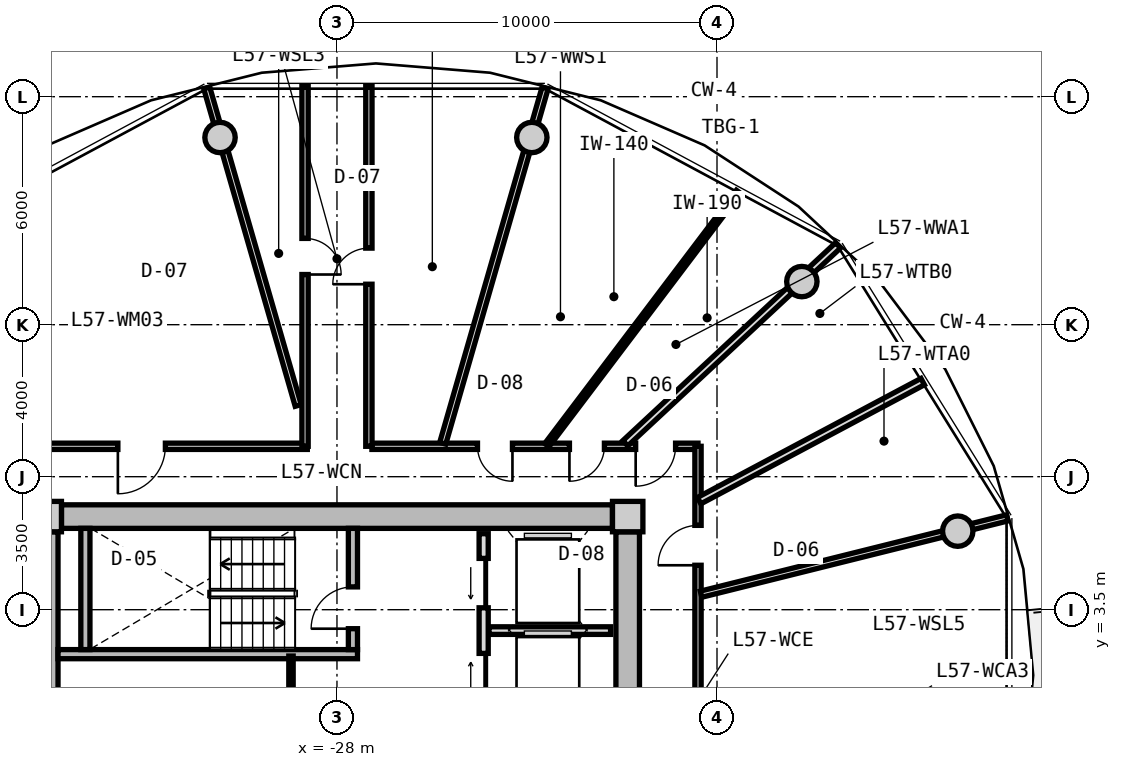
"""IFC4 building model, lengths in metres.
Left out: names, types, materials, properties, quantities, classifications, styles, units other than length and angle.
Written with IfcOpenShell. Run it as: python <this file> out.ifc"""

import sys

from ifc_helpers import new_model, si_unit, direction, frame, frame_2d, origin, origin_2d, place, context, subcontext, project, spatial, rectangle, circle, extrude, source, transform, mapped, element, fill, save


model = new_model("IFC4")
c1 = context("Model", 3, precision=1e-05, world=origin(), true_north=direction((0.0, 1.0)))
c2 = subcontext(c1, "Body", "Model", "MODEL_VIEW")
j1 = project(units=[si_unit("LENGTHUNIT", "METRE"), si_unit("PLANEANGLEUNIT", "RADIAN")], contexts=[c1])
p1 = place(None, origin())
s1 = spatial("IfcSite", under=j1, at=p1, CompositionType="ELEMENT")
p2 = place(p1, origin())
s2 = spatial("IfcBuilding", under=s1, at=p2, CompositionType="ELEMENT")
p3 = place(p2, frame((0.0, 0.0, 183.1)))
s3 = spatial("IfcBuildingStorey", under=s2, at=p3, CompositionType="ELEMENT", Elevation=183.1)
m1 = source(origin(), c2, "Body", "SweptSolid", [
    extrude(rectangle(XDim=0.8, YDim=0.8, at=origin_2d()), origin(), (0.0, 0.0, 1.0), 3.05),
])
for number, where, z_axis, x_axis in (
    (1, (-20.35, 5.95, 0.0), (0.0, 0.0, 1.0), (1.0, 0.0, 0.0)),
    (2, (-35.65, 5.95, 0.0), (0.0, 0.0, 1.0), (1.0, 0.0, 0.0)),
):
    element("IfcColumn", number, at=place(p3, frame(where, z_axis=z_axis, x_axis=x_axis)), inside=s3, PredefinedType="COLUMN", context=c2, shape_type="MappedRepresentation", body=[
        mapped(m1, transform((0.0, 0.0, 0.0), x_axis=(1.0, 0.0, 0.0), y_axis=(0.0, 1.0, 0.0), z_axis=(0.0, 0.0, 1.0), scale=1.0)),
    ])
m2 = source(origin(), c2, "Body", "SweptSolid", [
    extrude(rectangle(XDim=14.5, YDim=0.62, at=frame_2d((7.25, 0.0))), origin(), (0.0, 0.0, 1.0), 2.73),
])
p4 = place(p3, frame((-35.25, 5.95, 0.0), z_axis=(0.0, 0.0, 1.0), x_axis=(1.0, 0.0, 0.0)))
e3 = element("IfcWall", 3, at=p4, inside=s3, PredefinedType="SHEAR", context=c2, shape_type="MappedRepresentation", body=[
    mapped(m2, transform((0.0, 0.0, 0.0), x_axis=(1.0, 0.0, 0.0), y_axis=(0.0, 1.0, 0.0), z_axis=(0.0, 0.0, 1.0), scale=1.0)),
])
m3 = source(origin(), c2, "Body", "SweptSolid", [
    extrude(rectangle(XDim=11.1, YDim=0.62, at=frame_2d((5.55, 0.0))), origin(), (0.0, 0.0, 1.0), 2.73),
])
p5 = place(p3, frame((-35.65, -5.55, 0.0), z_axis=(0.0, 0.0, 1.0), x_axis=(0.0, 1.0, 0.0)))
e4 = element("IfcWall", 4, at=p5, inside=s3, PredefinedType="SHEAR", context=c2, shape_type="MappedRepresentation", body=[
    mapped(m3, transform((0.0, 0.0, 0.0), x_axis=(1.0, 0.0, 0.0), y_axis=(0.0, 1.0, 0.0), z_axis=(0.0, 0.0, 1.0), scale=1.0)),
])
p6 = place(p5, frame((3.8, 0.0, 0.0)))
e5 = element("IfcOpeningElement", 5, at=p6, cuts=e4, PredefinedType="OPENING", context=c2, shape_type="SweptSolid", body=[
    extrude(rectangle(XDim=1.2, YDim=2.15, at=frame_2d((0.6, 1.075))), frame((0.0, 0.32, 0.0), z_axis=(0.0, -1.0, 0.0), x_axis=(1.0, 0.0, 0.0)), (0.0, 0.0, 1.0), 0.64),
])
p7 = place(p3, frame((-20.35, 5.55, 0.0), z_axis=(0.0, 0.0, 1.0), x_axis=(0.0, -1.0, 0.0)))
e6 = element("IfcWall", 6, at=p7, inside=s3, PredefinedType="SHEAR", context=c2, shape_type="MappedRepresentation", body=[
    mapped(m3, transform((0.0, 0.0, 0.0), x_axis=(1.0, 0.0, 0.0), y_axis=(0.0, 1.0, 0.0), z_axis=(0.0, 0.0, 1.0), scale=1.0)),
])
p8 = place(p7, frame((5.65, 0.0, 0.0)))
e7 = element("IfcOpeningElement", 7, at=p8, cuts=e6, PredefinedType="OPENING", context=c2, shape_type="SweptSolid", body=[
    extrude(rectangle(XDim=1.2, YDim=2.15, at=frame_2d((0.6, 1.075))), frame((0.0, 0.32, 0.0), z_axis=(0.0, -1.0, 0.0), x_axis=(1.0, 0.0, 0.0)), (0.0, 0.0, 1.0), 0.64),
])
m4 = source(origin(), c2, "Body", "SweptSolid", [
    extrude(circle(Radius=0.4, at=origin_2d()), origin(), (0.0, 0.0, 1.0), 3.05),
])
for number, where, z_axis, x_axis in (
    (8, (-11.665, 5.567, 0.0), (0.0, 0.0, 1.0), (1.0, 0.0, 0.0)),
    (9, (-15.767, 12.135, 0.0), (0.0, 0.0, 1.0), (1.0, 0.0, 0.0)),
    (10, (-22.873, 15.926, 0.0), (0.0, 0.0, 1.0), (1.0, 0.0, 0.0)),
    (11, (-31.077, 15.926, 0.0), (0.0, 0.0, 1.0), (1.0, 0.0, 0.0)),
):
    element("IfcColumn", number, at=place(p3, frame(where, z_axis=z_axis, x_axis=x_axis)), inside=s3, PredefinedType="COLUMN", context=c2, shape_type="MappedRepresentation", body=[
        mapped(m4, transform((0.0, 0.0, 0.0), x_axis=(1.0, 0.0, 0.0), y_axis=(0.0, 1.0, 0.0), z_axis=(0.0, 0.0, 1.0), scale=1.0)),
    ])
m5 = source(origin(), c2, "Body", "SweptSolid", [
    extrude(rectangle(XDim=7.88, YDim=0.24, at=frame_2d((3.94, 0.0))), origin(), (0.0, 0.0, 1.0), 2.73),
])
p9 = place(p3, frame((-35.34, 2.33, 0.0), z_axis=(0.0, 0.0, 1.0), x_axis=(1.0, 0.0, 0.0)))
e12 = element("IfcWall", 12, at=p9, inside=s3, PredefinedType="PARTITIONING", context=c2, shape_type="MappedRepresentation", body=[
    mapped(m5, transform((0.0, 0.0, 0.0), x_axis=(1.0, 0.0, 0.0), y_axis=(0.0, 1.0, 0.0), z_axis=(0.0, 0.0, 1.0), scale=1.0)),
])
m6 = source(origin(), c2, "Body", "SweptSolid", [
    extrude(rectangle(XDim=3.19, YDim=0.24, at=frame_2d((1.595, 0.0))), origin(), (0.0, 0.0, 1.0), 2.73),
])
p10 = place(p3, frame((-34.62, 2.45, 0.0), z_axis=(0.0, 0.0, 1.0), x_axis=(0.0, 1.0, 0.0)))
e13 = element("IfcWall", 13, at=p10, inside=s3, PredefinedType="PARTITIONING", context=c2, shape_type="MappedRepresentation", body=[
    mapped(m6, transform((0.0, 0.0, 0.0), x_axis=(1.0, 0.0, 0.0), y_axis=(0.0, 1.0, 0.0), z_axis=(0.0, 0.0, 1.0), scale=1.0)),
])
p11 = place(p3, frame((-27.58, 2.45, 0.0), z_axis=(0.0, 0.0, 1.0), x_axis=(0.0, 1.0, 0.0)))
e14 = element("IfcWall", 14, at=p11, inside=s3, PredefinedType="PARTITIONING", context=c2, shape_type="MappedRepresentation", body=[
    mapped(m6, transform((0.0, 0.0, 0.0), x_axis=(1.0, 0.0, 0.0), y_axis=(0.0, 1.0, 0.0), z_axis=(0.0, 0.0, 1.0), scale=1.0)),
])
p12 = place(p11, frame((0.55, 0.0, 0.0)))
e15 = element("IfcOpeningElement", 15, at=p12, cuts=e14, PredefinedType="OPENING", context=c2, shape_type="SweptSolid", body=[
    extrude(rectangle(XDim=1.1, YDim=2.15, at=frame_2d((0.55, 1.075))), frame((0.0, 0.13, 0.0), z_axis=(0.0, -1.0, 0.0), x_axis=(1.0, 0.0, 0.0)), (0.0, 0.0, 1.0), 0.26),
])
m7 = source(origin(), c2, "Body", "SweptSolid", [
    extrude(rectangle(XDim=5.0, YDim=0.24, at=frame_2d((2.5, 0.0))), origin(), (0.0, 0.0, 1.0), 2.715),
])
p13 = place(p3, frame((-24.14, 0.5, 0.0), z_axis=(0.0, 0.0, 1.0), x_axis=(0.0, 1.0, 0.0)))
e16 = element("IfcWall", 16, at=p13, inside=s3, PredefinedType="PARTITIONING", context=c2, shape_type="MappedRepresentation", body=[
    mapped(m7, transform((0.0, 0.0, 0.0), x_axis=(1.0, 0.0, 0.0), y_axis=(0.0, 1.0, 0.0), z_axis=(0.0, 0.0, 1.0), scale=1.0)),
])
p14 = place(p13, frame((3.05, 0.0, 0.0)))
e17 = element("IfcOpeningElement", 17, at=p14, cuts=e16, PredefinedType="OPENING", context=c2, shape_type="SweptSolid", body=[
    extrude(rectangle(XDim=1.3, YDim=2.2, at=frame_2d((0.65, 1.1))), frame((0.0, 0.13, 0.0), z_axis=(0.0, -1.0, 0.0), x_axis=(1.0, 0.0, 0.0)), (0.0, 0.0, 1.0), 0.26),
])
p15 = place(p13, frame((0.55, 0.0, 0.0)))
e18 = element("IfcOpeningElement", 18, at=p15, cuts=e16, PredefinedType="OPENING", context=c2, shape_type="SweptSolid", body=[
    extrude(rectangle(XDim=1.3, YDim=2.2, at=frame_2d((0.65, 1.1))), frame((0.0, 0.13, 0.0), z_axis=(0.0, -1.0, 0.0), x_axis=(1.0, 0.0, 0.0)), (0.0, 0.0, 1.0), 0.26),
])
m8 = source(origin(), c2, "Body", "SweptSolid", [
    extrude(rectangle(XDim=3.2, YDim=0.2, at=frame_2d((1.6, 0.0))), origin(), (0.0, 0.0, 1.0), 2.715),
])
p16 = place(p3, frame((-24.0, 2.95, 0.0), z_axis=(0.0, 0.0, 1.0), x_axis=(1.0, 0.0, 0.0)))
e19 = element("IfcWall", 19, at=p16, inside=s3, PredefinedType="PARTITIONING", context=c2, shape_type="MappedRepresentation", body=[
    mapped(m8, transform((0.0, 0.0, 0.0), x_axis=(1.0, 0.0, 0.0), y_axis=(0.0, 1.0, 0.0), z_axis=(0.0, 0.0, 1.0), scale=1.0)),
])
m9 = source(origin(), c2, "Body", "SweptSolid", [
    extrude(rectangle(XDim=2.33, YDim=0.115, at=frame_2d((1.165, 0.0))), origin(), (0.0, 0.0, 1.0), 2.715),
])
p17 = place(p3, frame((-29.21, -0.05, 0.0), z_axis=(0.0, 0.0, 1.0), x_axis=(0.0, 1.0, 0.0)))
e20 = element("IfcWall", 20, at=p17, inside=s3, PredefinedType="PARTITIONING", context=c2, shape_type="MappedRepresentation", body=[
    mapped(m9, transform((0.0, 0.0, 0.0), x_axis=(1.0, 0.0, 0.0), y_axis=(0.0, 1.0, 0.0), z_axis=(0.0, 0.0, 1.0), scale=1.0)),
])
m10 = source(origin(), c2, "Body", "SweptSolid", [
    extrude(rectangle(XDim=8.719, YDim=0.165, at=frame_2d((4.36, 0.0))), origin(), (0.0, 0.0, 1.0), 2.715),
])
p18 = place(p3, frame((-37.5, 7.8, 0.0), z_axis=(0.0, 0.0, 1.0), x_axis=(1.0, 0.0, 0.0)))
e21 = element("IfcWall", 21, at=p18, inside=s3, PredefinedType="PARTITIONING", context=c2, shape_type="MappedRepresentation", body=[
    mapped(m10, transform((0.0, 0.0, 0.0), x_axis=(1.0, 0.0, 0.0), y_axis=(0.0, 1.0, 0.0), z_axis=(0.0, 0.0, 1.0), scale=1.0)),
])
p19 = place(p18, frame((3.735, 0.0, 0.0)))
e22 = element("IfcOpeningElement", 22, at=p19, cuts=e21, PredefinedType="OPENING", context=c2, shape_type="SweptSolid", body=[
    extrude(rectangle(XDim=1.25, YDim=2.2, at=frame_2d((0.625, 1.1))), frame((0.0, 0.093, 0.0), z_axis=(0.0, -1.0, 0.0), x_axis=(1.0, 0.0, 0.0)), (0.0, 0.0, 1.0), 0.185),
])
m11 = source(origin(), c2, "Body", "SweptSolid", [
    extrude(rectangle(XDim=8.58, YDim=0.165, at=frame_2d((4.29, 0.0))), origin(), (0.0, 0.0, 1.0), 2.715),
])
p20 = place(p3, frame((-27.08, 7.8, 0.0), z_axis=(0.0, 0.0, 1.0), x_axis=(1.0, 0.0, 0.0)))
e23 = element("IfcWall", 23, at=p20, inside=s3, PredefinedType="PARTITIONING", context=c2, shape_type="MappedRepresentation", body=[
    mapped(m11, transform((0.0, 0.0, 0.0), x_axis=(1.0, 0.0, 0.0), y_axis=(0.0, 1.0, 0.0), z_axis=(0.0, 0.0, 1.0), scale=1.0)),
])
p21 = place(p20, frame((6.94, 0.0, 0.0)))
e24 = element("IfcOpeningElement", 24, at=p21, cuts=e23, PredefinedType="OPENING", context=c2, shape_type="SweptSolid", body=[
    extrude(rectangle(XDim=1.05, YDim=2.15, at=frame_2d((0.525, 1.075))), frame((0.0, 0.093, 0.0), z_axis=(0.0, -1.0, 0.0), x_axis=(1.0, 0.0, 0.0)), (0.0, 0.0, 1.0), 0.185),
])
p22 = place(p20, frame((5.197, 0.0, 0.0)))
e25 = element("IfcOpeningElement", 25, at=p22, cuts=e23, PredefinedType="OPENING", context=c2, shape_type="SweptSolid", body=[
    extrude(rectangle(XDim=0.92, YDim=2.1, at=frame_2d((0.46, 1.05))), frame((0.0, 0.093, 0.0), z_axis=(0.0, -1.0, 0.0), x_axis=(1.0, 0.0, 0.0)), (0.0, 0.0, 1.0), 0.185),
])
p23 = place(p20, frame((2.778, 0.0, 0.0)))
e26 = element("IfcOpeningElement", 26, at=p23, cuts=e23, PredefinedType="OPENING", context=c2, shape_type="SweptSolid", body=[
    extrude(rectangle(XDim=0.92, YDim=2.1, at=frame_2d((0.46, 1.05))), frame((0.0, 0.093, 0.0), z_axis=(0.0, -1.0, 0.0), x_axis=(1.0, 0.0, 0.0)), (0.0, 0.0, 1.0), 0.185),
])
m12 = source(origin(), c2, "Body", "SweptSolid", [
    extrude(rectangle(XDim=6.88, YDim=0.165, at=frame_2d((3.44, 0.0))), origin(), (0.0, 0.0, 1.0), 2.715),
])
p24 = place(p3, frame((-18.5, 7.8, 0.0), z_axis=(0.0, 0.0, 1.0), x_axis=(0.0, -1.0, 0.0)))
e27 = element("IfcWall", 27, at=p24, inside=s3, PredefinedType="PARTITIONING", context=c2, shape_type="MappedRepresentation", body=[
    mapped(m12, transform((0.0, 0.0, 0.0), x_axis=(1.0, 0.0, 0.0), y_axis=(0.0, 1.0, 0.0), z_axis=(0.0, 0.0, 1.0), scale=1.0)),
])
p25 = place(p24, frame((2.081, 0.0, 0.0)))
e28 = element("IfcOpeningElement", 28, at=p25, cuts=e27, PredefinedType="OPENING", context=c2, shape_type="SweptSolid", body=[
    extrude(rectangle(XDim=1.05, YDim=2.15, at=frame_2d((0.525, 1.075))), frame((0.0, 0.093, 0.0), z_axis=(0.0, -1.0, 0.0), x_axis=(1.0, 0.0, 0.0)), (0.0, 0.0, 1.0), 0.185),
])
m13 = source(origin(), c2, "Body", "SweptSolid", [
    extrude(rectangle(XDim=9.73, YDim=0.165, at=frame_2d((4.865, 0.0))), origin(), (0.0, 0.0, 1.0), 2.265),
])
p26 = place(p3, frame((-25.217, 7.88, 0.0), z_axis=(0.0, 0.0, 1.0), x_axis=(0.27679492614, 0.960929013436, 0.0)))
e29 = element("IfcWall", 29, at=p26, inside=s3, PredefinedType="PARTITIONING", context=c2, shape_type="MappedRepresentation", body=[
    mapped(m13, transform((0.0, 0.0, 0.0), x_axis=(1.0, 0.0, 0.0), y_axis=(0.0, 1.0, 0.0), z_axis=(0.0, 0.0, 1.0), scale=1.0)),
])
m14 = source(origin(), c2, "Body", "SweptSolid", [
    extrude(rectangle(XDim=8.695, YDim=0.165, at=frame_2d((4.348, 0.0))), origin(), (0.0, 0.0, 1.0), 2.265),
])
p27 = place(p3, frame((-29.02, 8.875, 0.0), z_axis=(0.0, 0.0, 1.0), x_axis=(-0.276797231892, 0.960928349263, 0.0)))
e30 = element("IfcWall", 30, at=p27, inside=s3, PredefinedType="PARTITIONING", context=c2, shape_type="MappedRepresentation", body=[
    mapped(m14, transform((0.0, 0.0, 0.0), x_axis=(1.0, 0.0, 0.0), y_axis=(0.0, 1.0, 0.0), z_axis=(0.0, 0.0, 1.0), scale=1.0)),
])
m15 = source(origin(), c2, "Body", "SweptSolid", [
    extrude(rectangle(XDim=8.305, YDim=0.165, at=frame_2d((4.153, 0.0))), origin(), (0.0, 0.0, 1.0), 2.265),
])
p28 = place(p3, frame((-18.42, 3.908, 0.0), z_axis=(0.0, 0.0, 1.0), x_axis=(0.970309994378, 0.241864662175, 0.0)))
e31 = element("IfcWall", 31, at=p28, inside=s3, PredefinedType="PARTITIONING", context=c2, shape_type="MappedRepresentation", body=[
    mapped(m15, transform((0.0, 0.0, 0.0), x_axis=(1.0, 0.0, 0.0), y_axis=(0.0, 1.0, 0.0), z_axis=(0.0, 0.0, 1.0), scale=1.0)),
])
m16 = source(origin(), c2, "Body", "SweptSolid", [
    extrude(rectangle(XDim=9.48, YDim=0.165, at=frame_2d((4.74, 0.0))), origin(), (0.0, 0.0, 1.0), 2.715),
])
p29 = place(p3, frame((-28.84, 7.8, 0.0), z_axis=(0.0, 0.0, 1.0), x_axis=(0.0, 1.0, 0.0)))
e32 = element("IfcWall", 32, at=p29, inside=s3, PredefinedType="PARTITIONING", context=c2, shape_type="MappedRepresentation", body=[
    mapped(m16, transform((0.0, 0.0, 0.0), x_axis=(1.0, 0.0, 0.0), y_axis=(0.0, 1.0, 0.0), z_axis=(0.0, 0.0, 1.0), scale=1.0)),
])
p30 = place(p29, frame((4.521, 0.0, 0.0)))
e33 = element("IfcOpeningElement", 33, at=p30, cuts=e32, PredefinedType="OPENING", context=c2, shape_type="SweptSolid", body=[
    extrude(rectangle(XDim=0.95, YDim=2.1, at=frame_2d((0.475, 1.05))), frame((0.0, 0.093, 0.0), z_axis=(0.0, -1.0, 0.0), x_axis=(1.0, 0.0, 0.0)), (0.0, 0.0, 1.0), 0.185),
])
p31 = place(p3, frame((-27.16, 17.28, 0.0), z_axis=(0.0, 0.0, 1.0), x_axis=(0.0, -1.0, 0.0)))
e34 = element("IfcWall", 34, at=p31, inside=s3, PredefinedType="PARTITIONING", context=c2, shape_type="MappedRepresentation", body=[
    mapped(m16, transform((0.0, 0.0, 0.0), x_axis=(1.0, 0.0, 0.0), y_axis=(0.0, 1.0, 0.0), z_axis=(0.0, 0.0, 1.0), scale=1.0)),
])
p32 = place(p31, frame((4.265, 0.0, 0.0)))
e35 = element("IfcOpeningElement", 35, at=p32, cuts=e34, PredefinedType="OPENING", context=c2, shape_type="SweptSolid", body=[
    extrude(rectangle(XDim=0.95, YDim=2.1, at=frame_2d((0.475, 1.05))), frame((0.0, 0.093, 0.0), z_axis=(0.0, -1.0, 0.0), x_axis=(1.0, 0.0, 0.0)), (0.0, 0.0, 1.0), 0.185),
])
m17 = source(origin(), c2, "Body", "SweptSolid", [
    extrude(rectangle(XDim=7.648, YDim=0.19, at=frame_2d((3.824, 0.0))), origin(), (0.0, 0.0, 1.0), 2.265),
])
p33 = place(p3, frame((-20.413, 7.88, 0.0), z_axis=(0.0, 0.0, 1.0), x_axis=(0.732182665826, 0.681108320213, 0.0)))
e36 = element("IfcWall", 36, at=p33, inside=s3, PredefinedType="PARTITIONING", context=c2, shape_type="MappedRepresentation", body=[
    mapped(m17, transform((0.0, 0.0, 0.0), x_axis=(1.0, 0.0, 0.0), y_axis=(0.0, 1.0, 0.0), z_axis=(0.0, 0.0, 1.0), scale=1.0)),
])
m18 = source(origin(), c2, "Body", "SweptSolid", [
    extrude(rectangle(XDim=6.665, YDim=0.19, at=frame_2d((3.333, 0.0))), origin(), (0.0, 0.0, 1.0), 2.715),
])
p34 = place(p3, frame((-18.47, 6.37, 0.0), z_axis=(0.0, 0.0, 1.0), x_axis=(0.88263769619, 0.470053930166, 0.0)))
e37 = element("IfcWall", 37, at=p34, inside=s3, PredefinedType="PARTITIONING", context=c2, shape_type="MappedRepresentation", body=[
    mapped(m18, transform((0.0, 0.0, 0.0), x_axis=(1.0, 0.0, 0.0), y_axis=(0.0, 1.0, 0.0), z_axis=(0.0, 0.0, 1.0), scale=1.0)),
])
m19 = source(origin(), c2, "Body", "SweptSolid", [
    extrude(rectangle(XDim=8.359, YDim=0.14, at=frame_2d((4.18, 0.0))), origin(), (0.0, 0.0, 1.0), 2.715),
])
p35 = place(p3, frame((-22.477, 7.83, 0.0), z_axis=(0.0, 0.0, 1.0), x_axis=(0.603265985309, 0.797540062297, 0.0)))
e38 = element("IfcWall", 38, at=p35, inside=s3, PredefinedType="PARTITIONING", context=c2, shape_type="MappedRepresentation", body=[
    mapped(m19, transform((0.0, 0.0, 0.0), x_axis=(1.0, 0.0, 0.0), y_axis=(0.0, 1.0, 0.0), z_axis=(0.0, 0.0, 1.0), scale=1.0)),
])
m20 = source(origin(), c2, "Body", "SweptSolid", [
    extrude(rectangle(XDim=1.1, YDim=2.15, at=frame_2d((0.55, 1.075))), frame((0.0, 0.025, 0.0), z_axis=(0.0, -1.0, 0.0), x_axis=(1.0, 0.0, 0.0)), (0.0, 0.0, 1.0), 0.05),
])
p36 = place(p12, origin())
e39 = element("IfcDoor", 39, at=p36, inside=s3, OperationType="SINGLE_SWING_LEFT", PredefinedType="DOOR", context=c2, shape_type="MappedRepresentation", body=[
    mapped(m20, transform((0.0, 0.0, 0.0), x_axis=(1.0, 0.0, 0.0), y_axis=(0.0, 1.0, 0.0), z_axis=(0.0, 0.0, 1.0), scale=1.0)),
])
fill(e15, e39)
m21 = source(origin(), c2, "Body", "SweptSolid", [
    extrude(rectangle(XDim=1.3, YDim=2.2, at=frame_2d((0.65, 1.1))), frame((0.0, 0.025, 0.0), z_axis=(0.0, -1.0, 0.0), x_axis=(1.0, 0.0, 0.0)), (0.0, 0.0, 1.0), 0.05),
])
p37 = place(p14, origin())
e40 = element("IfcDoor", 40, at=p37, inside=s3, OperationType="SLIDING_TO_LEFT", PredefinedType="DOOR", context=c2, shape_type="MappedRepresentation", body=[
    mapped(m21, transform((0.0, 0.0, 0.0), x_axis=(1.0, 0.0, 0.0), y_axis=(0.0, 1.0, 0.0), z_axis=(0.0, 0.0, 1.0), scale=1.0)),
])
fill(e17, e40)
p38 = place(p15, origin())
e41 = element("IfcDoor", 41, at=p38, inside=s3, OperationType="SLIDING_TO_RIGHT", PredefinedType="DOOR", context=c2, shape_type="MappedRepresentation", body=[
    mapped(m21, transform((0.0, 0.0, 0.0), x_axis=(1.0, 0.0, 0.0), y_axis=(0.0, 1.0, 0.0), z_axis=(0.0, 0.0, 1.0), scale=1.0)),
])
fill(e18, e41)
m22 = source(origin(), c2, "Body", "SweptSolid", [
    extrude(rectangle(XDim=0.95, YDim=2.1, at=frame_2d((0.475, 1.05))), frame((0.0, 0.025, 0.0), z_axis=(0.0, -1.0, 0.0), x_axis=(1.0, 0.0, 0.0)), (0.0, 0.0, 1.0), 0.05),
])
p39 = place(p30, frame((0.95, 0.0, 0.0), z_axis=(0.0, 0.0, 1.0), x_axis=(-1.0, 0.0, 0.0)))
e42 = element("IfcDoor", 42, at=p39, inside=s3, OperationType="SINGLE_SWING_RIGHT", PredefinedType="DOOR", context=c2, shape_type="MappedRepresentation", body=[
    mapped(m22, transform((0.0, 0.0, 0.0), x_axis=(1.0, 0.0, 0.0), y_axis=(0.0, 1.0, 0.0), z_axis=(0.0, 0.0, 1.0), scale=1.0)),
])
fill(e33, e42)
p40 = place(p32, frame((0.95, 0.0, 0.0), z_axis=(0.0, 0.0, 1.0), x_axis=(-1.0, 0.0, 0.0)))
e43 = element("IfcDoor", 43, at=p40, inside=s3, OperationType="SINGLE_SWING_LEFT", PredefinedType="DOOR", context=c2, shape_type="MappedRepresentation", body=[
    mapped(m22, transform((0.0, 0.0, 0.0), x_axis=(1.0, 0.0, 0.0), y_axis=(0.0, 1.0, 0.0), z_axis=(0.0, 0.0, 1.0), scale=1.0)),
])
fill(e35, e43)
m23 = source(origin(), c2, "Body", "SweptSolid", [
    extrude(rectangle(XDim=1.05, YDim=2.15, at=frame_2d((0.525, 1.075))), frame((0.0, 0.025, 0.0), z_axis=(0.0, -1.0, 0.0), x_axis=(1.0, 0.0, 0.0)), (0.0, 0.0, 1.0), 0.05),
])
p41 = place(p25, frame((1.05, 0.0, 0.0), z_axis=(0.0, 0.0, 1.0), x_axis=(-1.0, 0.0, 0.0)))
e44 = element("IfcDoor", 44, at=p41, inside=s3, OperationType="SINGLE_SWING_LEFT", PredefinedType="DOOR", context=c2, shape_type="MappedRepresentation", body=[
    mapped(m23, transform((0.0, 0.0, 0.0), x_axis=(1.0, 0.0, 0.0), y_axis=(0.0, 1.0, 0.0), z_axis=(0.0, 0.0, 1.0), scale=1.0)),
])
fill(e28, e44)
p42 = place(p21, frame((1.05, 0.0, 0.0), z_axis=(0.0, 0.0, 1.0), x_axis=(-1.0, 0.0, 0.0)))
e45 = element("IfcDoor", 45, at=p42, inside=s3, OperationType="SINGLE_SWING_RIGHT", PredefinedType="DOOR", context=c2, shape_type="MappedRepresentation", body=[
    mapped(m23, transform((0.0, 0.0, 0.0), x_axis=(1.0, 0.0, 0.0), y_axis=(0.0, 1.0, 0.0), z_axis=(0.0, 0.0, 1.0), scale=1.0)),
])
fill(e24, e45)
m24 = source(origin(), c2, "Body", "SweptSolid", [
    extrude(rectangle(XDim=0.92, YDim=2.1, at=frame_2d((0.46, 1.05))), frame((0.0, 0.025, 0.0), z_axis=(0.0, -1.0, 0.0), x_axis=(1.0, 0.0, 0.0)), (0.0, 0.0, 1.0), 0.05),
])
p43 = place(p22, frame((0.92, 0.0, 0.0), z_axis=(0.0, 0.0, 1.0), x_axis=(-1.0, 0.0, 0.0)))
e46 = element("IfcDoor", 46, at=p43, inside=s3, OperationType="SINGLE_SWING_RIGHT", PredefinedType="DOOR", context=c2, shape_type="MappedRepresentation", body=[
    mapped(m24, transform((0.0, 0.0, 0.0), x_axis=(1.0, 0.0, 0.0), y_axis=(0.0, 1.0, 0.0), z_axis=(0.0, 0.0, 1.0), scale=1.0)),
])
fill(e25, e46)
p44 = place(p23, frame((0.92, 0.0, 0.0), z_axis=(0.0, 0.0, 1.0), x_axis=(-1.0, 0.0, 0.0)))
e47 = element("IfcDoor", 47, at=p44, inside=s3, OperationType="SINGLE_SWING_LEFT", PredefinedType="DOOR", context=c2, shape_type="MappedRepresentation", body=[
    mapped(m24, transform((0.0, 0.0, 0.0), x_axis=(1.0, 0.0, 0.0), y_axis=(0.0, 1.0, 0.0), z_axis=(0.0, 0.0, 1.0), scale=1.0)),
])
fill(e26, e47)
m25 = source(origin(), c2, "Body", "SweptSolid", [
    extrude(rectangle(XDim=1.25, YDim=2.2, at=frame_2d((0.625, 1.1))), frame((0.0, 0.025, 0.0), z_axis=(0.0, -1.0, 0.0), x_axis=(1.0, 0.0, 0.0)), (0.0, 0.0, 1.0), 0.05),
])
p45 = place(p19, frame((1.25, 0.0, 0.0), z_axis=(0.0, 0.0, 1.0), x_axis=(-1.0, 0.0, 0.0)))
e48 = element("IfcDoor", 48, at=p45, inside=s3, OperationType="SINGLE_SWING_RIGHT", PredefinedType="DOOR", context=c2, shape_type="MappedRepresentation", body=[
    mapped(m25, transform((0.0, 0.0, 0.0), x_axis=(1.0, 0.0, 0.0), y_axis=(0.0, 1.0, 0.0), z_axis=(0.0, 0.0, 1.0), scale=1.0)),
])
fill(e22, e48)
save(model, sys.argv[1])
